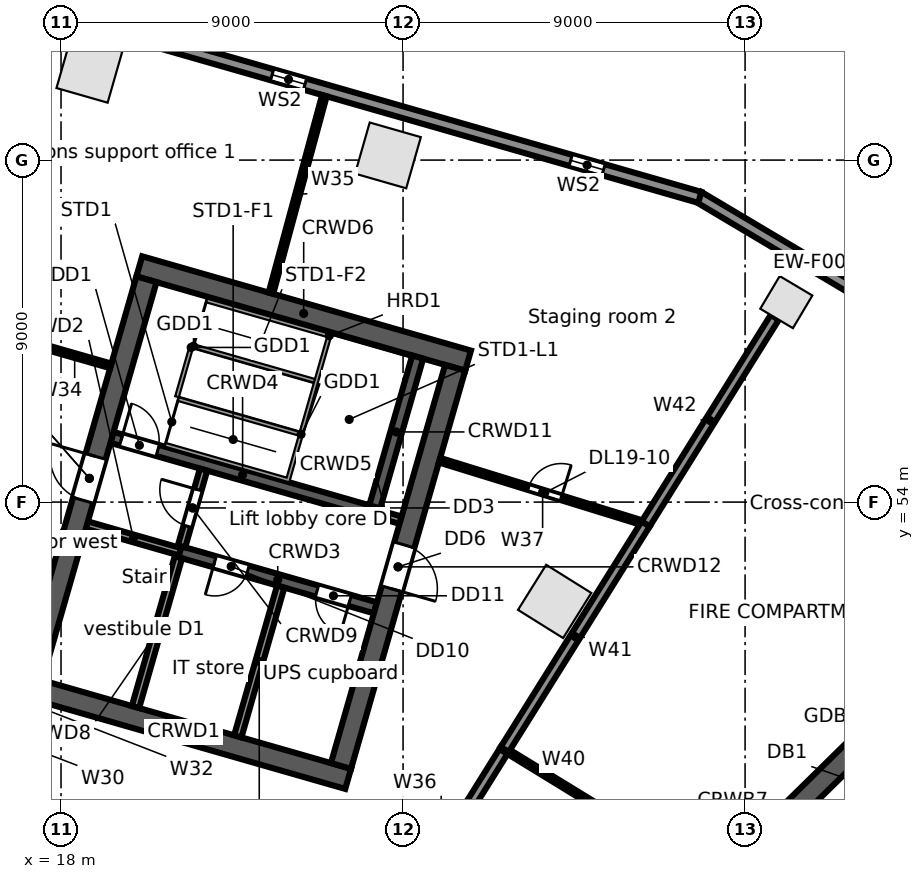
"""IFC4 building model, lengths in metres.
Left out: names, types, materials, properties, quantities, classifications, styles, units other than length and angle.
Written with IfcOpenShell. Run it as: python <this file> out.ifc"""

import sys

from ifc_helpers import new_model, si_unit, direction, frame, frame_2d, origin, origin_2d, place, context, subcontext, project, spatial, rectangle, extrude, element, fill, save


model = new_model("IFC4")
c1 = context("Model", 3, precision=1e-05, world=origin(), true_north=direction((0.0, 1.0)))
c2 = subcontext(c1, "Body", "Model", "MODEL_VIEW")
j1 = project(units=[si_unit("LENGTHUNIT", "METRE"), si_unit("PLANEANGLEUNIT", "RADIAN")], contexts=[c1])
p1 = place(None, origin())
s1 = spatial("IfcSite", under=j1, at=p1, CompositionType="ELEMENT")
p2 = place(p1, origin())
s2 = spatial("IfcBuilding", under=s1, at=p2, CompositionType="ELEMENT")
p3 = place(p2, frame((0.0, 0.0, 97.1)))
s3 = spatial("IfcBuildingStorey", under=s2, at=p3, CompositionType="ELEMENT", Elevation=97.1)
p4 = place(p3, frame((37.085, 59.262, 0.0), z_axis=(0.0, 0.0, 1.0), x_axis=(-0.859406411501, 0.511293086077, 0.0)))
e1 = element("IfcColumn", 1, at=p4, inside=s3, PredefinedType="COLUMN", context=c2, shape_type="SweptSolid", body=[
    extrude(rectangle(XDim=1.0, YDim=1.0, at=origin_2d()), origin(), (0.0, 0.0, 1.0), 4.4),
])
for number, where, z_axis, x_axis in (
    (2, (26.603, 63.124, 0.0), (0.0, 0.0, 1.0), (-0.961, 0.276, 0.0)),
    (3, (18.746, 65.376, 0.0), (0.0, 0.0, 1.0), (-0.961, 0.276, 0.0)),
    (4, (30.99, 51.386, 0.0), (0.0, 0.0, 1.0), (0.53, 0.848, 0.0)),
):
    element("IfcColumn", number, at=place(p3, frame(where, z_axis=z_axis, x_axis=x_axis)), inside=s3, PredefinedType="COLUMN", context=c2, shape_type="SweptSolid", body=[
        extrude(rectangle(XDim=1.4, YDim=1.4, at=origin_2d()), origin(), (0.0, 0.0, 1.0), 4.4),
    ])
p5 = place(p3, frame((34.773, 62.034, 0.0), z_axis=(0.0, 0.0, 1.0), x_axis=(0.859401317772, -0.511301647769, 0.0)))
e5 = element("IfcWall", 5, at=p5, inside=s3, PredefinedType="STANDARD", context=c2, shape_type="SweptSolid", body=[
    extrude(rectangle(XDim=6.808, YDim=0.3, at=frame_2d((3.404, 0.0))), origin(), (0.0, 0.0, 1.0), 4.08),
])
p6 = place(p3, frame((3.335, 71.044, 0.0), z_axis=(0.0, 0.0, 1.0), x_axis=(0.961260130989, -0.275642813387, 0.0)))
e6 = element("IfcWall", 6, at=p6, inside=s3, PredefinedType="STANDARD", context=c2, shape_type="SweptSolid", body=[
    extrude(rectangle(XDim=32.741, YDim=0.3, at=frame_2d((16.371, 0.0))), origin(), (0.0, 0.0, 1.0), 4.08),
])
p7 = place(p6, frame((29.207, 0.0, 0.6)))
e7 = element("IfcOpeningElement", 7, at=p7, cuts=e6, PredefinedType="OPENING", context=c2, shape_type="SweptSolid", body=[
    extrude(rectangle(XDim=0.9, YDim=2.8, at=frame_2d((0.45, 1.4))), frame((0.0, 0.16, 0.0), z_axis=(0.0, -1.0, 0.0), x_axis=(1.0, 0.0, 0.0)), (0.0, 0.0, 1.0), 0.32),
])
p8 = place(p6, frame((21.034, 0.0, 0.6)))
e8 = element("IfcOpeningElement", 8, at=p8, cuts=e6, PredefinedType="OPENING", context=c2, shape_type="SweptSolid", body=[
    extrude(rectangle(XDim=0.9, YDim=2.8, at=frame_2d((0.45, 1.4))), frame((0.0, 0.16, 0.0), z_axis=(0.0, -1.0, 0.0), x_axis=(1.0, 0.0, 0.0)), (0.0, 0.0, 1.0), 0.32),
])
p9 = place(p6, frame((12.861, 0.0, 0.6)))
e9 = element("IfcOpeningElement", 9, at=p9, cuts=e6, PredefinedType="OPENING", context=c2, shape_type="SweptSolid", body=[
    extrude(rectangle(XDim=0.9, YDim=2.8, at=frame_2d((0.45, 1.4))), frame((0.0, 0.16, 0.0), z_axis=(0.0, -1.0, 0.0), x_axis=(1.0, 0.0, 0.0)), (0.0, 0.0, 1.0), 0.32),
])
p10 = place(p6, frame((4.688, 0.0, 0.6)))
e10 = element("IfcOpeningElement", 10, at=p10, cuts=e6, PredefinedType="OPENING", context=c2, shape_type="SweptSolid", body=[
    extrude(rectangle(XDim=0.9, YDim=2.8, at=frame_2d((0.45, 1.4))), frame((0.0, 0.16, 0.0), z_axis=(0.0, -1.0, 0.0), x_axis=(1.0, 0.0, 0.0)), (0.0, 0.0, 1.0), 0.32),
])
p11 = place(p3, frame((25.398, 40.717, 0.0), z_axis=(0.0, 0.0, 1.0), x_axis=(-0.961262423262, 0.275634819324, 0.0)))
e11 = element("IfcWall", 11, at=p11, inside=s3, PredefinedType="STANDARD", context=c2, shape_type="SweptSolid", body=[
    extrude(rectangle(XDim=26.359, YDim=0.3, at=frame_2d((13.179, 0.0))), origin(), (0.0, 0.0, 1.0), 4.08),
])
p12 = place(p11, frame((22.664, 0.0, 0.6)))
e12 = element("IfcOpeningElement", 12, at=p12, cuts=e11, PredefinedType="OPENING", context=c2, shape_type="SweptSolid", body=[
    extrude(rectangle(XDim=0.9, YDim=2.8, at=frame_2d((0.45, 1.4))), frame((0.0, 0.16, 0.0), z_axis=(0.0, -1.0, 0.0), x_axis=(1.0, 0.0, 0.0)), (0.0, 0.0, 1.0), 0.32),
])
p13 = place(p11, frame((13.844, 0.0, 0.6)))
e13 = element("IfcOpeningElement", 13, at=p13, cuts=e11, PredefinedType="OPENING", context=c2, shape_type="SweptSolid", body=[
    extrude(rectangle(XDim=0.9, YDim=2.8, at=frame_2d((0.45, 1.4))), frame((0.0, 0.16, 0.0), z_axis=(0.0, -1.0, 0.0), x_axis=(1.0, 0.0, 0.0)), (0.0, 0.0, 1.0), 0.32),
])
p14 = place(p11, frame((5.023, 0.0, 0.6)))
e14 = element("IfcOpeningElement", 14, at=p14, cuts=e11, PredefinedType="OPENING", context=c2, shape_type="SweptSolid", body=[
    extrude(rectangle(XDim=0.9, YDim=2.8, at=frame_2d((0.45, 1.4))), frame((0.0, 0.16, 0.0), z_axis=(0.0, -1.0, 0.0), x_axis=(1.0, 0.0, 0.0)), (0.0, 0.0, 1.0), 0.32),
])
p15 = place(p3, frame((32.017, 40.742, 0.0), z_axis=(0.0, 0.0, 1.0), x_axis=(0.713253550094, 0.700906108746, 0.0)))
e15 = element("IfcWall", 15, at=p15, inside=s3, PredefinedType="SOLIDWALL", context=c2, shape_type="SweptSolid", body=[
    extrude(rectangle(XDim=13.9, YDim=0.55, at=frame_2d((6.95, 0.0))), origin(), (0.0, 0.0, 1.0), 4.08),
])
p16 = place(p3, frame((16.904, 49.197, 0.0), z_axis=(0.0, 0.0, 1.0), x_axis=(0.96126248289, -0.275634611374, 0.0)))
e16 = element("IfcWall", 16, at=p16, inside=s3, PredefinedType="SOLIDWALL", context=c2, shape_type="SweptSolid", body=[
    extrude(rectangle(XDim=9.0, YDim=0.55, at=frame_2d((4.5, 0.0))), origin(), (0.0, 0.0, 1.0), 4.08),
])
p17 = place(p3, frame((18.68, 53.396, 0.0), z_axis=(0.0, 0.0, 1.0), x_axis=(0.961234387647, -0.275732573349, 0.0)))
e17 = element("IfcWall", 17, at=p17, inside=s3, PredefinedType="SOLIDWALL", context=c2, shape_type="SweptSolid", body=[
    extrude(rectangle(XDim=2.55, YDim=0.2, at=frame_2d((1.275, 0.0))), origin(), (0.0, 0.0, 1.0), 4.08),
])
p18 = place(p3, frame((21.131, 52.692, 0.0), z_axis=(0.0, 0.0, 1.0), x_axis=(0.961265220997, -0.27562506218, 0.0)))
e18 = element("IfcWall", 18, at=p18, inside=s3, PredefinedType="SOLIDWALL", context=c2, shape_type="SweptSolid", body=[
    extrude(rectangle(XDim=5.35, YDim=0.3, at=frame_2d((2.675, 0.0))), origin(), (0.0, 0.0, 1.0), 4.08),
])
p19 = place(p18, frame((0.95, 0.0, 0.0)))
e19 = element("IfcOpeningElement", 19, at=p19, cuts=e18, PredefinedType="OPENING", context=c2, shape_type="SweptSolid", body=[
    extrude(rectangle(XDim=0.9, YDim=2.1, at=frame_2d((0.45, 1.05))), frame((0.0, 0.16, 0.0), z_axis=(0.0, -1.0, 0.0), x_axis=(1.0, 0.0, 0.0)), (0.0, 0.0, 1.0), 0.32),
])
p20 = place(p18, frame((3.75, 0.0, 0.0)))
e20 = element("IfcOpeningElement", 20, at=p20, cuts=e18, PredefinedType="OPENING", context=c2, shape_type="SweptSolid", body=[
    extrude(rectangle(XDim=0.9, YDim=2.1, at=frame_2d((0.45, 1.05))), frame((0.0, 0.16, 0.0), z_axis=(0.0, -1.0, 0.0), x_axis=(1.0, 0.0, 0.0)), (0.0, 0.0, 1.0), 0.32),
])
p21 = place(p3, frame((19.341, 55.702, 0.0), z_axis=(0.0, 0.0, 1.0), x_axis=(0.961263228157, -0.27563201228, 0.0)))
e21 = element("IfcWall", 21, at=p21, inside=s3, PredefinedType="SOLIDWALL", context=c2, shape_type="SweptSolid", body=[
    extrude(rectangle(XDim=7.15, YDim=0.3, at=frame_2d((3.575, 0.0))), origin(), (0.0, 0.0, 1.0), 4.08),
])
p22 = place(p21, frame((0.25, 0.0, 0.0)))
e22 = element("IfcOpeningElement", 22, at=p22, cuts=e21, PredefinedType="OPENING", context=c2, shape_type="SweptSolid", body=[
    extrude(rectangle(XDim=1.0, YDim=2.1, at=frame_2d((0.5, 1.05))), frame((0.0, 0.16, 0.0), z_axis=(0.0, -1.0, 0.0), x_axis=(1.0, 0.0, 0.0)), (0.0, 0.0, 1.0), 0.32),
])
p23 = place(p3, frame((26.214, 53.732, 0.0), z_axis=(0.0, 0.0, 1.0), x_axis=(0.961240918172, -0.275709806194, 0.0)))
e23 = element("IfcWall", 23, at=p23, inside=s3, PredefinedType="SOLIDWALL", context=c2, shape_type="SweptSolid", body=[
    extrude(rectangle(XDim=0.75, YDim=0.2, at=frame_2d((0.375, 0.0))), origin(), (0.0, 0.0, 1.0), 4.08),
])
p24 = place(p3, frame((20.06, 60.204, 0.0), z_axis=(0.0, 0.0, 1.0), x_axis=(0.96126248289, -0.275634611374, 0.0)))
e24 = element("IfcWall", 24, at=p24, inside=s3, PredefinedType="SOLIDWALL", context=c2, shape_type="SweptSolid", body=[
    extrude(rectangle(XDim=9.0, YDim=0.55, at=frame_2d((4.5, 0.0))), origin(), (0.0, 0.0, 1.0), 4.08),
])
p25 = place(p3, frame((17.244, 49.386, 0.0), z_axis=(0.0, 0.0, 1.0), x_axis=(0.275632146085, 0.96126318979, 0.0)))
e25 = element("IfcWall", 25, at=p25, inside=s3, PredefinedType="SOLIDWALL", context=c2, shape_type="SweptSolid", body=[
    extrude(rectangle(XDim=10.9, YDim=0.55, at=frame_2d((5.45, 0.0))), origin(), (0.0, 0.0, 1.0), 4.08),
])
p26 = place(p25, frame((4.85, 0.0, 0.0)))
e26 = element("IfcOpeningElement", 26, at=p26, cuts=e25, PredefinedType="OPENING", context=c2, shape_type="SweptSolid", body=[
    extrude(rectangle(XDim=1.2, YDim=2.1, at=frame_2d((0.6, 1.05))), frame((0.0, 0.285, 0.0), z_axis=(0.0, -1.0, 0.0), x_axis=(1.0, 0.0, 0.0)), (0.0, 0.0, 1.0), 0.57),
])
p27 = place(p3, frame((19.959, 48.607, 0.0), z_axis=(0.0, 0.0, 1.0), x_axis=(0.275641165445, 0.961260603537, 0.0)))
e27 = element("IfcWall", 27, at=p27, inside=s3, PredefinedType="SOLIDWALL", context=c2, shape_type="SweptSolid", body=[
    extrude(rectangle(XDim=4.1, YDim=0.2, at=frame_2d((2.05, 0.0))), origin(), (0.0, 0.0, 1.0), 4.08),
])
p28 = place(p3, frame((21.172, 52.837, 0.0), z_axis=(0.0, 0.0, 1.0), x_axis=(0.275657676022, 0.961255868981, 0.0)))
e28 = element("IfcWall", 28, at=p28, inside=s3, PredefinedType="PARTITIONING", context=c2, shape_type="SweptSolid", body=[
    extrude(rectangle(XDim=2.1, YDim=0.2, at=frame_2d((1.05, 0.0))), origin(), (0.0, 0.0, 1.0), 4.08),
])
p29 = place(p28, frame((0.55, 0.0, 0.0)))
e29 = element("IfcOpeningElement", 29, at=p29, cuts=e28, PredefinedType="OPENING", context=c2, shape_type="SweptSolid", body=[
    extrude(rectangle(XDim=1.0, YDim=2.1, at=frame_2d((0.5, 1.05))), frame((0.0, 0.11, 0.0), z_axis=(0.0, -1.0, 0.0), x_axis=(1.0, 0.0, 0.0)), (0.0, 0.0, 1.0), 0.22),
])
p30 = place(p3, frame((22.651, 47.835, 0.0), z_axis=(0.0, 0.0, 1.0), x_axis=(0.275625388668, 0.961265127383, 0.0)))
e30 = element("IfcWall", 30, at=p30, inside=s3, PredefinedType="PARTITIONING", context=c2, shape_type="SweptSolid", body=[
    extrude(rectangle(XDim=4.1, YDim=0.2, at=frame_2d((2.05, 0.0))), origin(), (0.0, 0.0, 1.0), 4.08),
])
p31 = place(p3, frame((26.256, 53.876, 0.0), z_axis=(0.0, 0.0, 1.0), x_axis=(0.275641165445, 0.961260603537, 0.0)))
e31 = element("IfcWall", 31, at=p31, inside=s3, PredefinedType="SOLIDWALL", context=c2, shape_type="SweptSolid", body=[
    extrude(rectangle(XDim=4.1, YDim=0.3, at=frame_2d((2.05, 0.0))), origin(), (0.0, 0.0, 1.0), 4.08),
])
p32 = place(p3, frame((25.366, 47.057, 0.0), z_axis=(0.0, 0.0, 1.0), x_axis=(0.275632146085, 0.96126318979, 0.0)))
e32 = element("IfcWall", 32, at=p32, inside=s3, PredefinedType="SOLIDWALL", context=c2, shape_type="SweptSolid", body=[
    extrude(rectangle(XDim=10.9, YDim=0.55, at=frame_2d((5.45, 0.0))), origin(), (0.0, 0.0, 1.0), 4.08),
])
p33 = place(p32, frame((4.85, 0.0, 0.0)))
e33 = element("IfcOpeningElement", 33, at=p33, cuts=e32, PredefinedType="OPENING", context=c2, shape_type="SweptSolid", body=[
    extrude(rectangle(XDim=1.2, YDim=2.1, at=frame_2d((0.6, 1.05))), frame((0.0, 0.285, 0.0), z_axis=(0.0, -1.0, 0.0), x_axis=(1.0, 0.0, 0.0)), (0.0, 0.0, 1.0), 0.57),
])
p34 = place(p3, frame((17.409, 58.129, 0.0), z_axis=(0.0, 0.0, 1.0), x_axis=(0.961253165474, -0.275667103345, 0.0)))
e34 = element("IfcWall", 34, at=p34, inside=s3, PredefinedType="PARTITIONING", context=c2, shape_type="SweptSolid", body=[
    extrude(rectangle(XDim=1.977, YDim=0.125, at=frame_2d((0.988, 0.0))), origin(), (0.0, 0.0, 1.0), 4.08),
])
p35 = place(p3, frame((23.523, 59.497, 0.0), z_axis=(0.0, 0.0, 1.0), x_axis=(0.261275557939, 0.965264255437, 0.0)))
e35 = element("IfcWall", 35, at=p35, inside=s3, PredefinedType="PARTITIONING", context=c2, shape_type="SweptSolid", body=[
    extrude(rectangle(XDim=5.385, YDim=0.125, at=frame_2d((2.692, 0.0))), origin(), (0.0, 0.0, 1.0), 3.36),
])
p36 = place(p3, frame((26.373, 42.206, 0.0), z_axis=(0.0, 0.0, 1.0), x_axis=(0.52987567935, 0.848075329457, 0.0)))
e36 = element("IfcWall", 36, at=p36, inside=s3, PredefinedType="PARTITIONING", context=c2, shape_type="SweptSolid", body=[
    extrude(rectangle(XDim=6.232, YDim=0.25, at=frame_2d((3.116, 0.0))), origin(), (0.0, 0.0, 1.0), 4.08),
])
p37 = place(p36, frame((2.2, 0.0, 0.0)))
e37 = element("IfcOpeningElement", 37, at=p37, cuts=e36, PredefinedType="OPENING", context=c2, shape_type="SweptSolid", body=[
    extrude(rectangle(XDim=1.8, YDim=2.1, at=frame_2d((0.9, 1.05))), frame((0.0, 0.135, 0.0), z_axis=(0.0, -1.0, 0.0), x_axis=(1.0, 0.0, 0.0)), (0.0, 0.0, 1.0), 0.27),
])
p38 = place(p3, frame((27.96, 55.103, 0.0), z_axis=(0.0, 0.0, 1.0), x_axis=(0.955442775069, -0.29517639399, 0.0)))
e38 = element("IfcWall", 38, at=p38, inside=s3, PredefinedType="PARTITIONING", context=c2, shape_type="SweptSolid", body=[
    extrude(rectangle(XDim=5.678, YDim=0.125, at=frame_2d((2.839, 0.0))), origin(), (0.0, 0.0, 1.0), 3.142),
])
p39 = place(p38, frame((2.45, 0.0, 0.0)))
e39 = element("IfcOpeningElement", 39, at=p39, cuts=e38, PredefinedType="OPENING", context=c2, shape_type="SweptSolid", body=[
    extrude(rectangle(XDim=0.9, YDim=2.1, at=frame_2d((0.45, 1.05))), frame((0.0, 0.073, 0.0), z_axis=(0.0, -1.0, 0.0), x_axis=(1.0, 0.0, 0.0)), (0.0, 0.0, 1.0), 0.145),
])
p40 = place(p3, frame((29.675, 47.491, 0.0), z_axis=(0.0, 0.0, 1.0), x_axis=(0.852591965232, -0.522577210392, 0.0)))
e40 = element("IfcWall", 40, at=p40, inside=s3, PredefinedType="PARTITIONING", context=c2, shape_type="SweptSolid", body=[
    extrude(rectangle(XDim=2.645, YDim=0.125, at=frame_2d((1.322, 0.0))), origin(), (0.0, 0.0, 1.0), 4.08),
])
p41 = place(p3, frame((29.675, 47.491, 0.0), z_axis=(0.0, 0.0, 1.0), x_axis=(0.529992669945, 0.848002222759, 0.0)))
e41 = element("IfcWall", 41, at=p41, inside=s3, PredefinedType="PARTITIONING", context=c2, shape_type="SweptSolid", body=[
    extrude(rectangle(XDim=7.0, YDim=0.25, at=frame_2d((3.5, 0.0))), origin(), (0.0, 0.0, 1.0), 3.142),
])
p42 = place(p3, frame((33.385, 53.427, 0.0), z_axis=(0.0, 0.0, 1.0), x_axis=(0.52989620904, 0.848062502204, 0.0)))
e42 = element("IfcWall", 42, at=p42, inside=s3, PredefinedType="PARTITIONING", context=c2, shape_type="SweptSolid", body=[
    extrude(rectangle(XDim=6.409, YDim=0.25, at=frame_2d((3.204, 0.0))), origin(), (0.0, 0.0, 1.0), 3.142),
])
p43 = place(p7, origin())
e43 = element("IfcWindow", 43, at=p43, inside=s3, PartitioningType="SINGLE_PANEL", PredefinedType="WINDOW", context=c2, shape_type="SweptSolid", body=[
    extrude(rectangle(XDim=0.9, YDim=2.8, at=frame_2d((0.45, 1.4))), frame((0.0, 0.03, 0.0), z_axis=(0.0, -1.0, 0.0), x_axis=(1.0, 0.0, 0.0)), (0.0, 0.0, 1.0), 0.06),
])
fill(e7, e43)
p44 = place(p8, origin())
e44 = element("IfcWindow", 44, at=p44, inside=s3, PartitioningType="SINGLE_PANEL", PredefinedType="WINDOW", context=c2, shape_type="SweptSolid", body=[
    extrude(rectangle(XDim=0.9, YDim=2.8, at=frame_2d((0.45, 1.4))), frame((0.0, 0.03, 0.0), z_axis=(0.0, -1.0, 0.0), x_axis=(1.0, 0.0, 0.0)), (0.0, 0.0, 1.0), 0.06),
])
fill(e8, e44)
p45 = place(p22, origin())
e45 = element("IfcDoor", 45, at=p45, inside=s3, OperationType="SINGLE_SWING_LEFT", PredefinedType="DOOR", context=c2, shape_type="SweptSolid", body=[
    extrude(rectangle(XDim=1.0, YDim=2.1, at=frame_2d((0.5, 1.05))), frame((0.0, 0.025, 0.0), z_axis=(0.0, -1.0, 0.0), x_axis=(1.0, 0.0, 0.0)), (0.0, 0.0, 1.0), 0.05),
])
fill(e22, e45)
p46 = place(p29, origin())
e46 = element("IfcDoor", 46, at=p46, inside=s3, OperationType="SINGLE_SWING_RIGHT", PredefinedType="DOOR", context=c2, shape_type="SweptSolid", body=[
    extrude(rectangle(XDim=1.0, YDim=2.1, at=frame_2d((0.5, 1.05))), frame((0.0, 0.025, 0.0), z_axis=(0.0, -1.0, 0.0), x_axis=(1.0, 0.0, 0.0)), (0.0, 0.0, 1.0), 0.05),
])
fill(e29, e46)
p47 = place(p26, origin())
e47 = element("IfcDoor", 47, at=p47, inside=s3, OperationType="SINGLE_SWING_RIGHT", PredefinedType="DOOR", context=c2, shape_type="SweptSolid", body=[
    extrude(rectangle(XDim=1.2, YDim=2.1, at=frame_2d((0.6, 1.05))), frame((0.0, 0.025, 0.0), z_axis=(0.0, -1.0, 0.0), x_axis=(1.0, 0.0, 0.0)), (0.0, 0.0, 1.0), 0.05),
])
fill(e26, e47)
p48 = place(p33, frame((1.2, 0.0, 0.0), z_axis=(0.0, 0.0, 1.0), x_axis=(-1.0, 0.0, 0.0)))
e48 = element("IfcDoor", 48, at=p48, inside=s3, OperationType="SINGLE_SWING_RIGHT", PredefinedType="DOOR", context=c2, shape_type="SweptSolid", body=[
    extrude(rectangle(XDim=1.2, YDim=2.1, at=frame_2d((0.6, 1.05))), frame((0.0, 0.025, 0.0), z_axis=(0.0, -1.0, 0.0), x_axis=(1.0, 0.0, 0.0)), (0.0, 0.0, 1.0), 0.05),
])
fill(e33, e48)
p49 = place(p19, frame((0.9, 0.0, 0.0), z_axis=(0.0, 0.0, 1.0), x_axis=(-1.0, 0.0, 0.0)))
e49 = element("IfcDoor", 49, at=p49, inside=s3, OperationType="SINGLE_SWING_RIGHT", PredefinedType="DOOR", context=c2, shape_type="SweptSolid", body=[
    extrude(rectangle(XDim=0.9, YDim=2.1, at=frame_2d((0.45, 1.05))), frame((0.0, 0.025, 0.0), z_axis=(0.0, -1.0, 0.0), x_axis=(1.0, 0.0, 0.0)), (0.0, 0.0, 1.0), 0.05),
])
fill(e19, e49)
p50 = place(p20, frame((0.9, 0.0, 0.0), z_axis=(0.0, 0.0, 1.0), x_axis=(-1.0, 0.0, 0.0)))
e50 = element("IfcDoor", 50, at=p50, inside=s3, OperationType="SINGLE_SWING_LEFT", PredefinedType="DOOR", context=c2, shape_type="SweptSolid", body=[
    extrude(rectangle(XDim=0.9, YDim=2.1, at=frame_2d((0.45, 1.05))), frame((0.0, 0.025, 0.0), z_axis=(0.0, -1.0, 0.0), x_axis=(1.0, 0.0, 0.0)), (0.0, 0.0, 1.0), 0.05),
])
fill(e20, e50)
p51 = place(p39, origin())
e51 = element("IfcDoor", 51, at=p51, inside=s3, OperationType="SINGLE_SWING_RIGHT", PredefinedType="DOOR", context=c2, shape_type="SweptSolid", body=[
    extrude(rectangle(XDim=0.9, YDim=2.1, at=frame_2d((0.45, 1.05))), frame((0.0, 0.025, 0.0), z_axis=(0.0, -1.0, 0.0), x_axis=(1.0, 0.0, 0.0)), (0.0, 0.0, 1.0), 0.05),
])
fill(e39, e51)
save(model, sys.argv[1])
